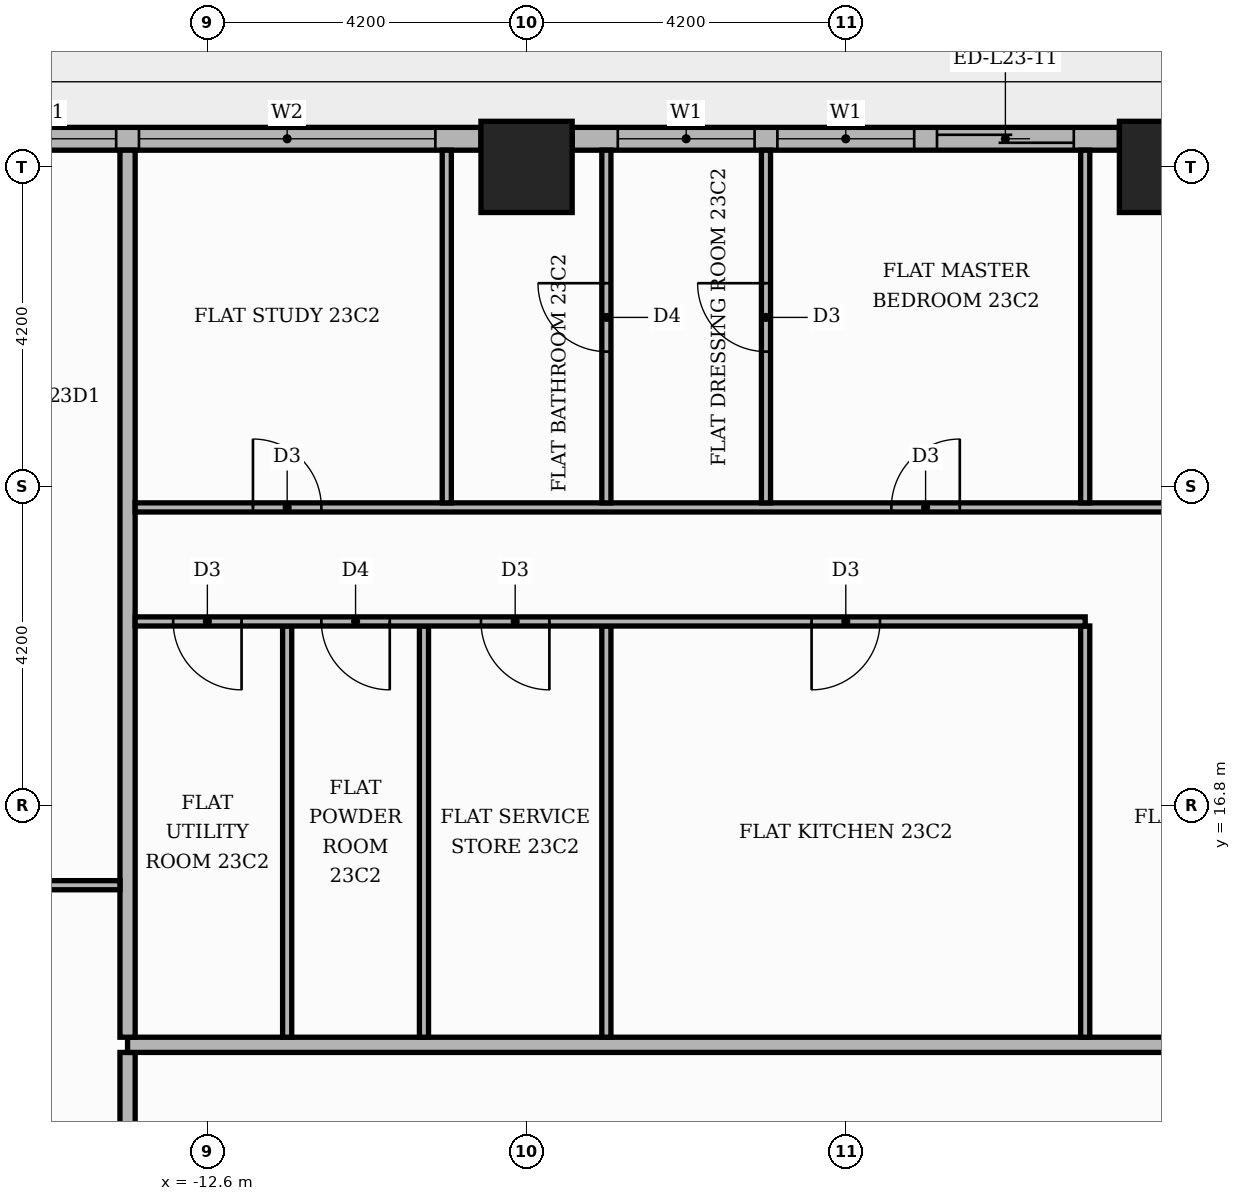
"""IFC4 building model, lengths in metres.
Left out: names, types, materials, properties, quantities, classifications, styles, units other than length and angle.
Written with IfcOpenShell. Run it as: python <this file> out.ifc"""

import sys

from ifc_helpers import new_model, si_unit, direction, frame, frame_2d, origin, origin_2d, place, context, subcontext, project, spatial, rectangle, extrude, element, fill, save


model = new_model("IFC4")
c1 = context("Model", 3, precision=1e-05, world=origin(), true_north=direction((0.0, 1.0)))
c2 = subcontext(c1, "Body", "Model", "MODEL_VIEW")
j1 = project(units=[si_unit("LENGTHUNIT", "METRE"), si_unit("PLANEANGLEUNIT", "RADIAN")], contexts=[c1])
p1 = place(None, origin())
s1 = spatial("IfcSite", under=j1, at=p1, CompositionType="ELEMENT")
p2 = place(p1, origin())
s2 = spatial("IfcBuilding", under=s1, at=p2, CompositionType="ELEMENT")
p3 = place(p2, frame((0.0, 0.0, 98.7)))
s3 = spatial("IfcBuildingStorey", under=s2, at=p3, CompositionType="ELEMENT", Elevation=98.7)
for number, where, z_axis, x_axis in (
    (1, (0.0, 25.2, 0.0), (0.0, 0.0, 1.0), (1.0, 0.0, 0.0)),
    (2, (-8.4, 25.2, 0.0), (0.0, 0.0, 1.0), (1.0, 0.0, 0.0)),
):
    element("IfcColumn", number, at=place(p3, frame(where, z_axis=z_axis, x_axis=x_axis)), inside=s3, PredefinedType="COLUMN", context=c2, shape_type="SweptSolid", body=[
        extrude(rectangle(XDim=1.2, YDim=1.2, at=origin_2d()), origin(), (0.0, 0.0, 1.0), 3.9),
    ])
p4 = place(p3, frame((-0.6, 25.57, 0.0), z_axis=(0.0, 0.0, 1.0), x_axis=(-1.0, 0.0, 0.0)))
e3 = element("IfcWall", 3, at=p4, inside=s3, PredefinedType="STANDARD", context=c2, shape_type="SweptSolid", body=[
    extrude(rectangle(XDim=7.2, YDim=0.3, at=frame_2d((3.6, 0.0))), origin(), (0.0, 0.0, 1.0), 3.48),
])
p5 = place(p4, frame((0.6, 0.0, 0.0)))
e4 = element("IfcOpeningElement", 4, at=p5, cuts=e3, PredefinedType="OPENING", context=c2, shape_type="SweptSolid", body=[
    extrude(rectangle(XDim=1.8, YDim=2.4, at=frame_2d((0.9, 1.2))), frame((0.0, 0.16, 0.0), z_axis=(0.0, -1.0, 0.0), x_axis=(1.0, 0.0, 0.0)), (0.0, 0.0, 1.0), 0.32),
])
p6 = place(p4, frame((2.7, 0.0, 0.9)))
e5 = element("IfcOpeningElement", 5, at=p6, cuts=e3, PredefinedType="OPENING", context=c2, shape_type="SweptSolid", body=[
    extrude(rectangle(XDim=1.8, YDim=2.1, at=frame_2d((0.9, 1.05))), frame((0.0, 0.16, 0.0), z_axis=(0.0, -1.0, 0.0), x_axis=(1.0, 0.0, 0.0)), (0.0, 0.0, 1.0), 0.32),
])
p7 = place(p4, frame((4.8, 0.0, 0.9)))
e6 = element("IfcOpeningElement", 6, at=p7, cuts=e3, PredefinedType="OPENING", context=c2, shape_type="SweptSolid", body=[
    extrude(rectangle(XDim=1.8, YDim=2.1, at=frame_2d((0.9, 1.05))), frame((0.0, 0.16, 0.0), z_axis=(0.0, -1.0, 0.0), x_axis=(1.0, 0.0, 0.0)), (0.0, 0.0, 1.0), 0.32),
])
p8 = place(p3, frame((-9.0, 25.57, 0.0), z_axis=(0.0, 0.0, 1.0), x_axis=(-1.0, 0.0, 0.0)))
e7 = element("IfcWall", 7, at=p8, inside=s3, PredefinedType="STANDARD", context=c2, shape_type="SweptSolid", body=[
    extrude(rectangle(XDim=7.2, YDim=0.3, at=frame_2d((3.6, 0.0))), origin(), (0.0, 0.0, 1.0), 3.48),
])
p9 = place(p8, frame((0.6, 0.0, 0.9)))
e8 = element("IfcOpeningElement", 8, at=p9, cuts=e7, PredefinedType="OPENING", context=c2, shape_type="SweptSolid", body=[
    extrude(rectangle(XDim=3.9, YDim=2.1, at=frame_2d((1.95, 1.05))), frame((0.0, 0.16, 0.0), z_axis=(0.0, -1.0, 0.0), x_axis=(1.0, 0.0, 0.0)), (0.0, 0.0, 1.0), 0.32),
])
p10 = place(p8, frame((4.8, 0.0, 0.9)))
e9 = element("IfcOpeningElement", 9, at=p10, cuts=e7, PredefinedType="OPENING", context=c2, shape_type="SweptSolid", body=[
    extrude(rectangle(XDim=1.8, YDim=2.1, at=frame_2d((0.9, 1.05))), frame((0.0, 0.16, 0.0), z_axis=(0.0, -1.0, 0.0), x_axis=(1.0, 0.0, 0.0)), (0.0, 0.0, 1.0), 0.32),
])
p11 = place(p3, frame((-13.65, -13.55, 0.0), z_axis=(0.0, 0.0, 1.0), x_axis=(0.0, 1.0, 0.0)))
e10 = element("IfcWall", 10, at=p11, inside=s3, PredefinedType="PARTITIONING", context=c2, shape_type="SweptSolid", body=[
    extrude(rectangle(XDim=27.1, YDim=0.2, at=frame_2d((13.55, 0.0))), origin(), (0.0, 0.0, 1.0), 3.48),
])
p12 = place(p11, frame((24.55, 0.0, 0.0)))
e11 = element("IfcOpeningElement", 11, at=p12, cuts=e10, PredefinedType="OPENING", context=c2, shape_type="SweptSolid", body=[
    extrude(rectangle(XDim=1.1, YDim=2.4, at=frame_2d((0.55, 1.2))), frame((0.0, 0.11, 0.0), z_axis=(0.0, -1.0, 0.0), x_axis=(1.0, 0.0, 0.0)), (0.0, 0.0, 1.0), 0.22),
])
p13 = place(p3, frame((-13.65, 13.65, 0.0), z_axis=(0.0, 0.0, 1.0), x_axis=(1.0, 0.0, 0.0)))
e12 = element("IfcWall", 12, at=p13, inside=s3, PredefinedType="PARTITIONING", context=c2, shape_type="SweptSolid", body=[
    extrude(rectangle(XDim=39.07, YDim=0.2, at=frame_2d((19.535, 0.0))), origin(), (0.0, 0.0, 1.0), 3.48),
])
p14 = place(p13, frame((24.65, 0.0, 0.0)))
e13 = element("IfcOpeningElement", 13, at=p14, cuts=e12, PredefinedType="OPENING", context=c2, shape_type="SweptSolid", body=[
    extrude(rectangle(XDim=1.1, YDim=2.4, at=frame_2d((0.55, 1.2))), frame((0.0, 0.11, 0.0), z_axis=(0.0, -1.0, 0.0), x_axis=(1.0, 0.0, 0.0)), (0.0, 0.0, 1.0), 0.22),
])
p15 = place(p13, frame((14.15, 0.0, 0.0)))
e14 = element("IfcOpeningElement", 14, at=p15, cuts=e12, PredefinedType="OPENING", context=c2, shape_type="SweptSolid", body=[
    extrude(rectangle(XDim=1.1, YDim=2.4, at=frame_2d((0.55, 1.2))), frame((0.0, 0.11, 0.0), z_axis=(0.0, -1.0, 0.0), x_axis=(1.0, 0.0, 0.0)), (0.0, 0.0, 1.0), 0.22),
])
p16 = place(p3, frame((-13.65, 13.75, 0.0), z_axis=(0.0, 0.0, 1.0), x_axis=(0.0, 1.0, 0.0)))
e15 = element("IfcWall", 15, at=p16, inside=s3, PredefinedType="PARTITIONING", context=c2, shape_type="SweptSolid", body=[
    extrude(rectangle(XDim=11.67, YDim=0.2, at=frame_2d((5.835, 0.0))), origin(), (0.0, 0.0, 1.0), 3.48),
])
for number, where, z_axis, x_axis in (
    (16, (-11.55, 13.75, 0.0), (0.0, 0.0, 1.0), (0.0, 1.0, 0.0)),
    (17, (-9.75, 13.75, 0.0), (0.0, 0.0, 1.0), (0.0, 1.0, 0.0)),
    (18, (-7.35, 13.75, 0.0), (0.0, 0.0, 1.0), (0.0, 1.0, 0.0)),
    (19, (-1.05, 13.75, 0.0), (0.0, 0.0, 1.0), (0.0, 1.0, 0.0)),
):
    element("IfcWall", number, at=place(p3, frame(where, z_axis=z_axis, x_axis=x_axis)), inside=s3, PredefinedType="PARTITIONING", context=c2, shape_type="SweptSolid", body=[
        extrude(rectangle(XDim=5.41, YDim=0.12, at=frame_2d((2.705, 0.0))), origin(), (0.0, 0.0, 1.0), 3.48),
    ])
p17 = place(p3, frame((-20.42, 15.75, 0.0), z_axis=(0.0, 0.0, 1.0), x_axis=(1.0, 0.0, 0.0)))
e20 = element("IfcWall", 20, at=p17, inside=s3, PredefinedType="PARTITIONING", context=c2, shape_type="SweptSolid", body=[
    extrude(rectangle(XDim=6.67, YDim=0.12, at=frame_2d((3.335, 0.0))), origin(), (0.0, 0.0, 1.0), 3.48),
])
p18 = place(p17, frame((2.935, 0.0, 0.0)))
e21 = element("IfcOpeningElement", 21, at=p18, cuts=e20, PredefinedType="OPENING", context=c2, shape_type="SweptSolid", body=[
    extrude(rectangle(XDim=0.9, YDim=2.1, at=frame_2d((0.45, 1.05))), frame((0.0, 0.07, 0.0), z_axis=(0.0, -1.0, 0.0), x_axis=(1.0, 0.0, 0.0)), (0.0, 0.0, 1.0), 0.14),
])
p19 = place(p3, frame((-13.55, 19.22, 0.0), z_axis=(0.0, 0.0, 1.0), x_axis=(1.0, 0.0, 0.0)))
e22 = element("IfcWall", 22, at=p19, inside=s3, PredefinedType="PARTITIONING", context=c2, shape_type="SweptSolid", body=[
    extrude(rectangle(XDim=12.5, YDim=0.12, at=frame_2d((6.25, 0.0))), origin(), (0.0, 0.0, 1.0), 3.48),
])
p20 = place(p19, frame((8.9, 0.0, 0.0)))
e23 = element("IfcOpeningElement", 23, at=p20, cuts=e22, PredefinedType="OPENING", context=c2, shape_type="SweptSolid", body=[
    extrude(rectangle(XDim=0.9, YDim=2.1, at=frame_2d((0.45, 1.05))), frame((0.0, 0.07, 0.0), z_axis=(0.0, -1.0, 0.0), x_axis=(1.0, 0.0, 0.0)), (0.0, 0.0, 1.0), 0.14),
])
p21 = place(p19, frame((4.55, 0.0, 0.0)))
e24 = element("IfcOpeningElement", 24, at=p21, cuts=e22, PredefinedType="OPENING", context=c2, shape_type="SweptSolid", body=[
    extrude(rectangle(XDim=0.9, YDim=2.1, at=frame_2d((0.45, 1.05))), frame((0.0, 0.07, 0.0), z_axis=(0.0, -1.0, 0.0), x_axis=(1.0, 0.0, 0.0)), (0.0, 0.0, 1.0), 0.14),
])
p22 = place(p19, frame((2.45, 0.0, 0.0)))
e25 = element("IfcOpeningElement", 25, at=p22, cuts=e22, PredefinedType="OPENING", context=c2, shape_type="SweptSolid", body=[
    extrude(rectangle(XDim=0.9, YDim=2.1, at=frame_2d((0.45, 1.05))), frame((0.0, 0.07, 0.0), z_axis=(0.0, -1.0, 0.0), x_axis=(1.0, 0.0, 0.0)), (0.0, 0.0, 1.0), 0.14),
])
p23 = place(p19, frame((0.5, 0.0, 0.0)))
e26 = element("IfcOpeningElement", 26, at=p23, cuts=e22, PredefinedType="OPENING", context=c2, shape_type="SweptSolid", body=[
    extrude(rectangle(XDim=0.9, YDim=2.1, at=frame_2d((0.45, 1.05))), frame((0.0, 0.07, 0.0), z_axis=(0.0, -1.0, 0.0), x_axis=(1.0, 0.0, 0.0)), (0.0, 0.0, 1.0), 0.14),
])
p24 = place(p3, frame((-13.55, 20.72, 0.0), z_axis=(0.0, 0.0, 1.0), x_axis=(1.0, 0.0, 0.0)))
e27 = element("IfcWall", 27, at=p24, inside=s3, PredefinedType="PARTITIONING", context=c2, shape_type="SweptSolid", body=[
    extrude(rectangle(XDim=18.7, YDim=0.12, at=frame_2d((9.35, 0.0))), origin(), (0.0, 0.0, 1.0), 3.48),
])
p25 = place(p24, frame((15.15, 0.0, 0.0)))
e28 = element("IfcOpeningElement", 28, at=p25, cuts=e27, PredefinedType="OPENING", context=c2, shape_type="SweptSolid", body=[
    extrude(rectangle(XDim=1.0, YDim=2.1, at=frame_2d((0.5, 1.05))), frame((0.0, 0.07, 0.0), z_axis=(0.0, -1.0, 0.0), x_axis=(1.0, 0.0, 0.0)), (0.0, 0.0, 1.0), 0.14),
])
p26 = place(p24, frame((9.95, 0.0, 0.0)))
e29 = element("IfcOpeningElement", 29, at=p26, cuts=e27, PredefinedType="OPENING", context=c2, shape_type="SweptSolid", body=[
    extrude(rectangle(XDim=0.9, YDim=2.1, at=frame_2d((0.45, 1.05))), frame((0.0, 0.07, 0.0), z_axis=(0.0, -1.0, 0.0), x_axis=(1.0, 0.0, 0.0)), (0.0, 0.0, 1.0), 0.14),
])
p27 = place(p24, frame((1.55, 0.0, 0.0)))
e30 = element("IfcOpeningElement", 30, at=p27, cuts=e27, PredefinedType="OPENING", context=c2, shape_type="SweptSolid", body=[
    extrude(rectangle(XDim=0.9, YDim=2.1, at=frame_2d((0.45, 1.05))), frame((0.0, 0.07, 0.0), z_axis=(0.0, -1.0, 0.0), x_axis=(1.0, 0.0, 0.0)), (0.0, 0.0, 1.0), 0.14),
])
p28 = place(p3, frame((-9.45, 20.78, 0.0), z_axis=(0.0, 0.0, 1.0), x_axis=(0.0, 1.0, 0.0)))
e31 = element("IfcWall", 31, at=p28, inside=s3, PredefinedType="PARTITIONING", context=c2, shape_type="SweptSolid", body=[
    extrude(rectangle(XDim=4.64, YDim=0.12, at=frame_2d((2.32, 0.0))), origin(), (0.0, 0.0, 1.0), 3.48),
])
p29 = place(p3, frame((-7.35, 20.78, 0.0), z_axis=(0.0, 0.0, 1.0), x_axis=(0.0, 1.0, 0.0)))
e32 = element("IfcWall", 32, at=p29, inside=s3, PredefinedType="PARTITIONING", context=c2, shape_type="SweptSolid", body=[
    extrude(rectangle(XDim=4.64, YDim=0.12, at=frame_2d((2.32, 0.0))), origin(), (0.0, 0.0, 1.0), 3.48),
])
p30 = place(p29, frame((1.99, 0.0, 0.0)))
e33 = element("IfcOpeningElement", 33, at=p30, cuts=e32, PredefinedType="OPENING", context=c2, shape_type="SweptSolid", body=[
    extrude(rectangle(XDim=0.9, YDim=2.1, at=frame_2d((0.45, 1.05))), frame((0.0, 0.07, 0.0), z_axis=(0.0, -1.0, 0.0), x_axis=(1.0, 0.0, 0.0)), (0.0, 0.0, 1.0), 0.14),
])
p31 = place(p3, frame((-5.25, 20.78, 0.0), z_axis=(0.0, 0.0, 1.0), x_axis=(0.0, 1.0, 0.0)))
e34 = element("IfcWall", 34, at=p31, inside=s3, PredefinedType="PARTITIONING", context=c2, shape_type="SweptSolid", body=[
    extrude(rectangle(XDim=4.64, YDim=0.12, at=frame_2d((2.32, 0.0))), origin(), (0.0, 0.0, 1.0), 3.48),
])
p32 = place(p31, frame((1.99, 0.0, 0.0)))
e35 = element("IfcOpeningElement", 35, at=p32, cuts=e34, PredefinedType="OPENING", context=c2, shape_type="SweptSolid", body=[
    extrude(rectangle(XDim=0.9, YDim=2.1, at=frame_2d((0.45, 1.05))), frame((0.0, 0.07, 0.0), z_axis=(0.0, -1.0, 0.0), x_axis=(1.0, 0.0, 0.0)), (0.0, 0.0, 1.0), 0.14),
])
p33 = place(p3, frame((-1.05, 20.78, 0.0), z_axis=(0.0, 0.0, 1.0), x_axis=(0.0, 1.0, 0.0)))
e36 = element("IfcWall", 36, at=p33, inside=s3, PredefinedType="PARTITIONING", context=c2, shape_type="SweptSolid", body=[
    extrude(rectangle(XDim=4.64, YDim=0.12, at=frame_2d((2.32, 0.0))), origin(), (0.0, 0.0, 1.0), 3.48),
])
p34 = place(p5, origin())
e37 = element("IfcDoor", 37, at=p34, inside=s3, OperationType="SLIDING_TO_LEFT", PredefinedType="DOOR", context=c2, shape_type="SweptSolid", body=[
    extrude(rectangle(XDim=1.8, YDim=2.4, at=frame_2d((0.9, 1.2))), frame((0.0, 0.025, 0.0), z_axis=(0.0, -1.0, 0.0), x_axis=(1.0, 0.0, 0.0)), (0.0, 0.0, 1.0), 0.05),
])
fill(e4, e37)
p35 = place(p6, origin())
e38 = element("IfcWindow", 38, at=p35, inside=s3, PartitioningType="SINGLE_PANEL", PredefinedType="WINDOW", context=c2, shape_type="SweptSolid", body=[
    extrude(rectangle(XDim=1.8, YDim=2.1, at=frame_2d((0.9, 1.05))), frame((0.0, 0.03, 0.0), z_axis=(0.0, -1.0, 0.0), x_axis=(1.0, 0.0, 0.0)), (0.0, 0.0, 1.0), 0.06),
])
fill(e5, e38)
p36 = place(p7, origin())
e39 = element("IfcWindow", 39, at=p36, inside=s3, PartitioningType="SINGLE_PANEL", PredefinedType="WINDOW", context=c2, shape_type="SweptSolid", body=[
    extrude(rectangle(XDim=1.8, YDim=2.1, at=frame_2d((0.9, 1.05))), frame((0.0, 0.03, 0.0), z_axis=(0.0, -1.0, 0.0), x_axis=(1.0, 0.0, 0.0)), (0.0, 0.0, 1.0), 0.06),
])
fill(e6, e39)
p37 = place(p9, origin())
e40 = element("IfcWindow", 40, at=p37, inside=s3, PartitioningType="SINGLE_PANEL", PredefinedType="WINDOW", context=c2, shape_type="SweptSolid", body=[
    extrude(rectangle(XDim=3.9, YDim=2.1, at=frame_2d((1.95, 1.05))), frame((0.0, 0.03, 0.0), z_axis=(0.0, -1.0, 0.0), x_axis=(1.0, 0.0, 0.0)), (0.0, 0.0, 1.0), 0.06),
])
fill(e8, e40)
p38 = place(p10, origin())
e41 = element("IfcWindow", 41, at=p38, inside=s3, PartitioningType="SINGLE_PANEL", PredefinedType="WINDOW", context=c2, shape_type="SweptSolid", body=[
    extrude(rectangle(XDim=1.8, YDim=2.1, at=frame_2d((0.9, 1.05))), frame((0.0, 0.03, 0.0), z_axis=(0.0, -1.0, 0.0), x_axis=(1.0, 0.0, 0.0)), (0.0, 0.0, 1.0), 0.06),
])
fill(e9, e41)
p39 = place(p20, frame((0.9, 0.0, 0.0), z_axis=(0.0, 0.0, 1.0), x_axis=(-1.0, 0.0, 0.0)))
e42 = element("IfcDoor", 42, at=p39, inside=s3, OperationType="SINGLE_SWING_LEFT", PredefinedType="DOOR", context=c2, shape_type="SweptSolid", body=[
    extrude(rectangle(XDim=0.9, YDim=2.1, at=frame_2d((0.45, 1.05))), frame((0.0, 0.025, 0.0), z_axis=(0.0, -1.0, 0.0), x_axis=(1.0, 0.0, 0.0)), (0.0, 0.0, 1.0), 0.05),
])
fill(e23, e42)
p40 = place(p21, frame((0.9, 0.0, 0.0), z_axis=(0.0, 0.0, 1.0), x_axis=(-1.0, 0.0, 0.0)))
e43 = element("IfcDoor", 43, at=p40, inside=s3, OperationType="SINGLE_SWING_RIGHT", PredefinedType="DOOR", context=c2, shape_type="SweptSolid", body=[
    extrude(rectangle(XDim=0.9, YDim=2.1, at=frame_2d((0.45, 1.05))), frame((0.0, 0.025, 0.0), z_axis=(0.0, -1.0, 0.0), x_axis=(1.0, 0.0, 0.0)), (0.0, 0.0, 1.0), 0.05),
])
fill(e24, e43)
p41 = place(p22, frame((0.9, 0.0, 0.0), z_axis=(0.0, 0.0, 1.0), x_axis=(-1.0, 0.0, 0.0)))
e44 = element("IfcDoor", 44, at=p41, inside=s3, OperationType="SINGLE_SWING_RIGHT", PredefinedType="DOOR", context=c2, shape_type="SweptSolid", body=[
    extrude(rectangle(XDim=0.9, YDim=2.1, at=frame_2d((0.45, 1.05))), frame((0.0, 0.025, 0.0), z_axis=(0.0, -1.0, 0.0), x_axis=(1.0, 0.0, 0.0)), (0.0, 0.0, 1.0), 0.05),
])
fill(e25, e44)
p42 = place(p23, frame((0.9, 0.0, 0.0), z_axis=(0.0, 0.0, 1.0), x_axis=(-1.0, 0.0, 0.0)))
e45 = element("IfcDoor", 45, at=p42, inside=s3, OperationType="SINGLE_SWING_RIGHT", PredefinedType="DOOR", context=c2, shape_type="SweptSolid", body=[
    extrude(rectangle(XDim=0.9, YDim=2.1, at=frame_2d((0.45, 1.05))), frame((0.0, 0.025, 0.0), z_axis=(0.0, -1.0, 0.0), x_axis=(1.0, 0.0, 0.0)), (0.0, 0.0, 1.0), 0.05),
])
fill(e26, e45)
p43 = place(p26, origin())
e46 = element("IfcDoor", 46, at=p43, inside=s3, OperationType="SINGLE_SWING_RIGHT", PredefinedType="DOOR", context=c2, shape_type="SweptSolid", body=[
    extrude(rectangle(XDim=0.9, YDim=2.1, at=frame_2d((0.45, 1.05))), frame((0.0, 0.025, 0.0), z_axis=(0.0, -1.0, 0.0), x_axis=(1.0, 0.0, 0.0)), (0.0, 0.0, 1.0), 0.05),
])
fill(e29, e46)
p44 = place(p32, origin())
e47 = element("IfcDoor", 47, at=p44, inside=s3, OperationType="SINGLE_SWING_RIGHT", PredefinedType="DOOR", context=c2, shape_type="SweptSolid", body=[
    extrude(rectangle(XDim=0.9, YDim=2.1, at=frame_2d((0.45, 1.05))), frame((0.0, 0.025, 0.0), z_axis=(0.0, -1.0, 0.0), x_axis=(1.0, 0.0, 0.0)), (0.0, 0.0, 1.0), 0.05),
])
fill(e35, e47)
p45 = place(p30, origin())
e48 = element("IfcDoor", 48, at=p45, inside=s3, OperationType="SINGLE_SWING_RIGHT", PredefinedType="DOOR", context=c2, shape_type="SweptSolid", body=[
    extrude(rectangle(XDim=0.9, YDim=2.1, at=frame_2d((0.45, 1.05))), frame((0.0, 0.025, 0.0), z_axis=(0.0, -1.0, 0.0), x_axis=(1.0, 0.0, 0.0)), (0.0, 0.0, 1.0), 0.05),
])
fill(e33, e48)
p46 = place(p27, origin())
e49 = element("IfcDoor", 49, at=p46, inside=s3, OperationType="SINGLE_SWING_LEFT", PredefinedType="DOOR", context=c2, shape_type="SweptSolid", body=[
    extrude(rectangle(XDim=0.9, YDim=2.1, at=frame_2d((0.45, 1.05))), frame((0.0, 0.025, 0.0), z_axis=(0.0, -1.0, 0.0), x_axis=(1.0, 0.0, 0.0)), (0.0, 0.0, 1.0), 0.05),
])
fill(e30, e49)
save(model, sys.argv[1])
